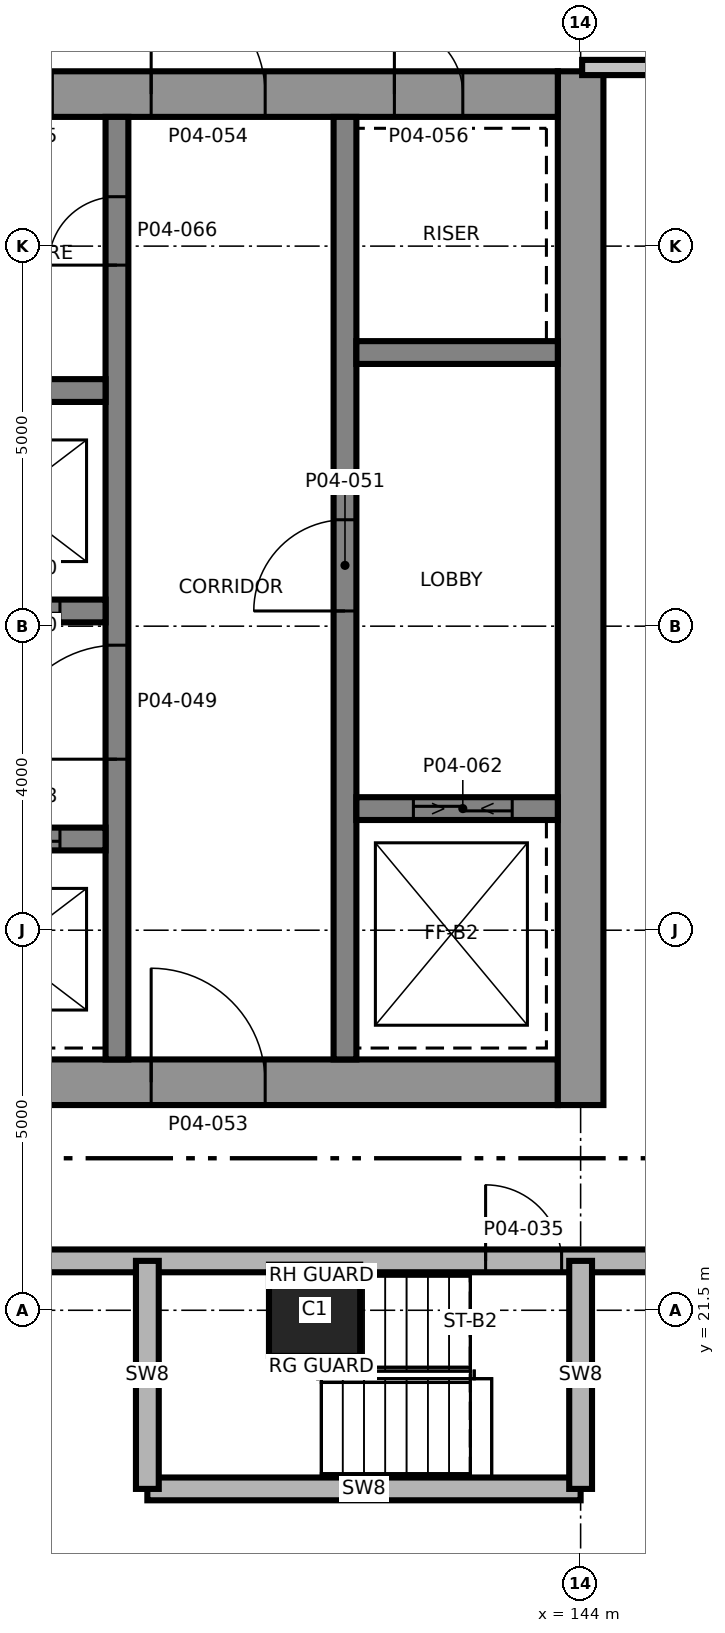
"""IFC4 building model, lengths in metres.
Left out: names, types, materials, properties, quantities, classifications, styles, units other than length and angle.
Written with IfcOpenShell. Run it as: python <this file> out.ifc"""

import sys

from ifc_helpers import new_model, si_unit, direction, frame, frame_2d, origin, origin_2d, place, context, subcontext, project, spatial, rectangle, extrude, element, fill, save


model = new_model("IFC4")
c1 = context("Model", 3, precision=1e-05, world=origin(), true_north=direction((0.0, 1.0)))
c2 = subcontext(c1, "Body", "Model", "MODEL_VIEW")
j1 = project(units=[si_unit("LENGTHUNIT", "METRE"), si_unit("PLANEANGLEUNIT", "RADIAN")], contexts=[c1])
p1 = place(None, origin())
s1 = spatial("IfcSite", under=j1, at=p1, CompositionType="ELEMENT")
p2 = place(p1, origin())
s2 = spatial("IfcBuilding", under=s1, at=p2, CompositionType="ELEMENT")
p3 = place(p2, frame((0.0, 0.0, 23.5)))
s3 = spatial("IfcBuildingStorey", under=s2, at=p3, CompositionType="ELEMENT", Elevation=23.5)
p4 = place(p3, frame((128.7, 24.5, 0.0), z_axis=(0.0, 0.0, 1.0), x_axis=(1.0, 0.0, 0.0)))
e1 = element("IfcWall", 1, at=p4, inside=s3, PredefinedType="SHEAR", context=c2, shape_type="SweptSolid", body=[
    extrude(rectangle(XDim=15.0, YDim=0.6, at=frame_2d((7.5, 0.0))), origin(), (0.0, 0.0, 1.0), 5.0),
])
p5 = place(p4, frame((9.65, 0.0, 0.0)))
e2 = element("IfcOpeningElement", 2, at=p5, cuts=e1, PredefinedType="OPENING", context=c2, shape_type="SweptSolid", body=[
    extrude(rectangle(XDim=1.5, YDim=2.1, at=frame_2d((0.75, 1.05))), frame((0.0, 0.31, 0.0), z_axis=(0.0, -1.0, 0.0), x_axis=(1.0, 0.0, 0.0)), (0.0, 0.0, 1.0), 0.62),
])
p6 = place(p4, frame((1.25, 0.0, 0.0)))
e3 = element("IfcOpeningElement", 3, at=p6, cuts=e1, PredefinedType="OPENING", context=c2, shape_type="SweptSolid", body=[
    extrude(rectangle(XDim=0.9, YDim=2.1, at=frame_2d((0.45, 1.05))), frame((0.0, 0.31, 0.0), z_axis=(0.0, -1.0, 0.0), x_axis=(1.0, 0.0, 0.0)), (0.0, 0.0, 1.0), 0.62),
])
p7 = place(p3, frame((144.0, 24.2, 0.0), z_axis=(0.0, 0.0, 1.0), x_axis=(0.0, 1.0, 0.0)))
e4 = element("IfcWall", 4, at=p7, inside=s3, PredefinedType="SHEAR", context=c2, shape_type="SweptSolid", body=[
    extrude(rectangle(XDim=13.6, YDim=0.6, at=frame_2d((6.8, 0.0))), origin(), (0.0, 0.0, 1.0), 5.0),
])
p8 = place(p3, frame((128.7, 37.5, 0.0), z_axis=(0.0, 0.0, 1.0), x_axis=(1.0, 0.0, 0.0)))
e5 = element("IfcWall", 5, at=p8, inside=s3, PredefinedType="SHEAR", context=c2, shape_type="SweptSolid", body=[
    extrude(rectangle(XDim=15.0, YDim=0.6, at=frame_2d((7.5, 0.0))), origin(), (0.0, 0.0, 1.0), 5.0),
])
p9 = place(p8, frame((9.65, 0.0, 0.0)))
e6 = element("IfcOpeningElement", 6, at=p9, cuts=e5, PredefinedType="OPENING", context=c2, shape_type="SweptSolid", body=[
    extrude(rectangle(XDim=1.5, YDim=2.1, at=frame_2d((0.75, 1.05))), frame((0.0, 0.31, 0.0), z_axis=(0.0, -1.0, 0.0), x_axis=(1.0, 0.0, 0.0)), (0.0, 0.0, 1.0), 0.62),
])
p10 = place(p8, frame((12.85, 0.0, 0.0)))
e7 = element("IfcOpeningElement", 7, at=p10, cuts=e5, PredefinedType="OPENING", context=c2, shape_type="SweptSolid", body=[
    extrude(rectangle(XDim=0.9, YDim=2.1, at=frame_2d((0.45, 1.05))), frame((0.0, 0.31, 0.0), z_axis=(0.0, -1.0, 0.0), x_axis=(1.0, 0.0, 0.0)), (0.0, 0.0, 1.0), 0.62),
])
p11 = place(p8, frame((3.65, 0.0, 0.0)))
e8 = element("IfcOpeningElement", 8, at=p11, cuts=e5, PredefinedType="OPENING", context=c2, shape_type="SweptSolid", body=[
    extrude(rectangle(XDim=0.9, YDim=2.1, at=frame_2d((0.45, 1.05))), frame((0.0, 0.31, 0.0), z_axis=(0.0, -1.0, 0.0), x_axis=(1.0, 0.0, 0.0)), (0.0, 0.0, 1.0), 0.62),
])
p12 = place(p8, frame((5.55, 0.0, 0.0)))
e9 = element("IfcOpeningElement", 9, at=p12, cuts=e5, PredefinedType="OPENING", context=c2, shape_type="SweptSolid", body=[
    extrude(rectangle(XDim=0.9, YDim=2.1, at=frame_2d((0.45, 1.05))), frame((0.0, 0.31, 0.0), z_axis=(0.0, -1.0, 0.0), x_axis=(1.0, 0.0, 0.0)), (0.0, 0.0, 1.0), 0.62),
])
p13 = place(p8, frame((7.45, 0.0, 0.0)))
e10 = element("IfcOpeningElement", 10, at=p13, cuts=e5, PredefinedType="OPENING", context=c2, shape_type="SweptSolid", body=[
    extrude(rectangle(XDim=0.9, YDim=2.1, at=frame_2d((0.45, 1.05))), frame((0.0, 0.31, 0.0), z_axis=(0.0, -1.0, 0.0), x_axis=(1.0, 0.0, 0.0)), (0.0, 0.0, 1.0), 0.62),
])
p14 = place(p3, frame((137.9, 24.8, 0.0), z_axis=(0.0, 0.0, 1.0), x_axis=(0.0, 1.0, 0.0)))
e11 = element("IfcWall", 11, at=p14, inside=s3, PredefinedType="SHEAR", context=c2, shape_type="SweptSolid", body=[
    extrude(rectangle(XDim=12.4, YDim=0.3, at=frame_2d((6.2, 0.0))), origin(), (0.0, 0.0, 1.0), 5.0),
])
p15 = place(p14, frame((3.95, 0.0, 0.0)))
e12 = element("IfcOpeningElement", 12, at=p15, cuts=e11, PredefinedType="OPENING", context=c2, shape_type="SweptSolid", body=[
    extrude(rectangle(XDim=1.5, YDim=2.1, at=frame_2d((0.75, 1.05))), frame((0.0, 0.16, 0.0), z_axis=(0.0, -1.0, 0.0), x_axis=(1.0, 0.0, 0.0)), (0.0, 0.0, 1.0), 0.32),
])
p16 = place(p14, frame((10.45, 0.0, 0.0)))
e13 = element("IfcOpeningElement", 13, at=p16, cuts=e11, PredefinedType="OPENING", context=c2, shape_type="SweptSolid", body=[
    extrude(rectangle(XDim=0.9, YDim=2.1, at=frame_2d((0.45, 1.05))), frame((0.0, 0.16, 0.0), z_axis=(0.0, -1.0, 0.0), x_axis=(1.0, 0.0, 0.0)), (0.0, 0.0, 1.0), 0.32),
])
p17 = place(p3, frame((140.9, 24.8, 0.0), z_axis=(0.0, 0.0, 1.0), x_axis=(0.0, 1.0, 0.0)))
e14 = element("IfcWall", 14, at=p17, inside=s3, PredefinedType="SHEAR", context=c2, shape_type="SweptSolid", body=[
    extrude(rectangle(XDim=12.4, YDim=0.3, at=frame_2d((6.2, 0.0))), origin(), (0.0, 0.0, 1.0), 5.0),
])
p18 = place(p17, frame((5.9, 0.0, 0.0)))
e15 = element("IfcOpeningElement", 15, at=p18, cuts=e14, PredefinedType="OPENING", context=c2, shape_type="SweptSolid", body=[
    extrude(rectangle(XDim=1.2, YDim=2.1, at=frame_2d((0.6, 1.05))), frame((0.0, 0.16, 0.0), z_axis=(0.0, -1.0, 0.0), x_axis=(1.0, 0.0, 0.0)), (0.0, 0.0, 1.0), 0.32),
])
p19 = place(p3, frame((132.25, 27.7, 0.0), z_axis=(0.0, 0.0, 1.0), x_axis=(1.0, 0.0, 0.0)))
e16 = element("IfcWall", 16, at=p19, inside=s3, PredefinedType="SHEAR", context=c2, shape_type="SweptSolid", body=[
    extrude(rectangle(XDim=5.5, YDim=0.3, at=frame_2d((2.75, 0.0))), origin(), (0.0, 0.0, 1.0), 5.0),
])
p20 = place(p19, frame((0.9, 0.0, 0.0)))
e17 = element("IfcOpeningElement", 17, at=p20, cuts=e16, PredefinedType="OPENING", context=c2, shape_type="SweptSolid", body=[
    extrude(rectangle(XDim=1.1, YDim=2.4, at=frame_2d((0.55, 1.2))), frame((0.0, 0.16, 0.0), z_axis=(0.0, -1.0, 0.0), x_axis=(1.0, 0.0, 0.0)), (0.0, 0.0, 1.0), 0.32),
])
p21 = place(p19, frame((3.8, 0.0, 0.0)))
e18 = element("IfcOpeningElement", 18, at=p21, cuts=e16, PredefinedType="OPENING", context=c2, shape_type="SweptSolid", body=[
    extrude(rectangle(XDim=1.1, YDim=2.4, at=frame_2d((0.55, 1.2))), frame((0.0, 0.16, 0.0), z_axis=(0.0, -1.0, 0.0), x_axis=(1.0, 0.0, 0.0)), (0.0, 0.0, 1.0), 0.32),
])
p22 = place(p3, frame((132.25, 30.7, 0.0), z_axis=(0.0, 0.0, 1.0), x_axis=(1.0, 0.0, 0.0)))
e19 = element("IfcWall", 19, at=p22, inside=s3, PredefinedType="SHEAR", context=c2, shape_type="SweptSolid", body=[
    extrude(rectangle(XDim=5.5, YDim=0.3, at=frame_2d((2.75, 0.0))), origin(), (0.0, 0.0, 1.0), 5.0),
])
p23 = place(p22, frame((0.9, 0.0, 0.0)))
e20 = element("IfcOpeningElement", 20, at=p23, cuts=e19, PredefinedType="OPENING", context=c2, shape_type="SweptSolid", body=[
    extrude(rectangle(XDim=1.1, YDim=2.4, at=frame_2d((0.55, 1.2))), frame((0.0, 0.16, 0.0), z_axis=(0.0, -1.0, 0.0), x_axis=(1.0, 0.0, 0.0)), (0.0, 0.0, 1.0), 0.32),
])
p24 = place(p22, frame((3.8, 0.0, 0.0)))
e21 = element("IfcOpeningElement", 21, at=p24, cuts=e19, PredefinedType="OPENING", context=c2, shape_type="SweptSolid", body=[
    extrude(rectangle(XDim=1.1, YDim=2.4, at=frame_2d((0.55, 1.2))), frame((0.0, 0.16, 0.0), z_axis=(0.0, -1.0, 0.0), x_axis=(1.0, 0.0, 0.0)), (0.0, 0.0, 1.0), 0.32),
])
p25 = place(p3, frame((132.25, 33.6, 0.0), z_axis=(0.0, 0.0, 1.0), x_axis=(1.0, 0.0, 0.0)))
e22 = element("IfcWall", 22, at=p25, inside=s3, PredefinedType="SHEAR", context=c2, shape_type="SweptSolid", body=[
    extrude(rectangle(XDim=5.5, YDim=0.3, at=frame_2d((2.75, 0.0))), origin(), (0.0, 0.0, 1.0), 5.0),
])
p26 = place(p3, frame((141.05, 28.1, 0.0), z_axis=(0.0, 0.0, 1.0), x_axis=(1.0, 0.0, 0.0)))
e23 = element("IfcWall", 23, at=p26, inside=s3, PredefinedType="SHEAR", context=c2, shape_type="SweptSolid", body=[
    extrude(rectangle(XDim=2.65, YDim=0.3, at=frame_2d((1.325, 0.0))), origin(), (0.0, 0.0, 1.0), 5.0),
])
p27 = place(p26, frame((0.75, 0.0, 0.0)))
e24 = element("IfcOpeningElement", 24, at=p27, cuts=e23, PredefinedType="OPENING", context=c2, shape_type="SweptSolid", body=[
    extrude(rectangle(XDim=1.3, YDim=2.4, at=frame_2d((0.65, 1.2))), frame((0.0, 0.16, 0.0), z_axis=(0.0, -1.0, 0.0), x_axis=(1.0, 0.0, 0.0)), (0.0, 0.0, 1.0), 0.32),
])
p28 = place(p3, frame((141.05, 34.1, 0.0), z_axis=(0.0, 0.0, 1.0), x_axis=(1.0, 0.0, 0.0)))
e25 = element("IfcWall", 25, at=p28, inside=s3, PredefinedType="SHEAR", context=c2, shape_type="SweptSolid", body=[
    extrude(rectangle(XDim=2.65, YDim=0.3, at=frame_2d((1.325, 0.0))), origin(), (0.0, 0.0, 1.0), 5.0),
])
p29 = place(p3, frame((140.5, 21.5, 0.0), z_axis=(0.0, 0.0, 1.0), x_axis=(1.0, 0.0, 0.0)))
e26 = element("IfcColumn", 26, at=p29, inside=s3, PredefinedType="COLUMN", context=c2, shape_type="SweptSolid", body=[
    extrude(rectangle(XDim=1.2, YDim=1.2, at=origin_2d()), origin(), (0.0, 0.0, 1.0), 5.0),
])
p30 = place(p3, frame((138.3, 19.15, 0.0), z_axis=(0.0, 0.0, 1.0), x_axis=(1.0, 0.0, 0.0)))
e27 = element("IfcWall", 27, at=p30, inside=s3, PredefinedType="SHEAR", context=c2, shape_type="SweptSolid", body=[
    extrude(rectangle(XDim=5.7, YDim=0.3, at=frame_2d((2.85, 0.0))), origin(), (0.0, 0.0, 1.0), 4.7),
])
p31 = place(p3, frame((125.75, 22.15, 0.0), z_axis=(0.0, 0.0, 1.0), x_axis=(1.0, 0.0, 0.0)))
e28 = element("IfcWall", 28, at=p31, inside=s3, PredefinedType="SHEAR", context=c2, shape_type="SweptSolid", body=[
    extrude(rectangle(XDim=21.5, YDim=0.3, at=frame_2d((10.75, 0.0))), origin(), (0.0, 0.0, 1.0), 4.7),
])
p32 = place(p31, frame((17.0, 0.0, 0.0)))
e29 = element("IfcOpeningElement", 29, at=p32, cuts=e28, PredefinedType="OPENING", context=c2, shape_type="SweptSolid", body=[
    extrude(rectangle(XDim=1.0, YDim=2.1, at=frame_2d((0.5, 1.05))), frame((0.0, 0.16, 0.0), z_axis=(0.0, -1.0, 0.0), x_axis=(1.0, 0.0, 0.0)), (0.0, 0.0, 1.0), 0.32),
])
p33 = place(p31, frame((6.75, 0.0, 0.0)))
e30 = element("IfcOpeningElement", 30, at=p33, cuts=e28, PredefinedType="OPENING", context=c2, shape_type="SweptSolid", body=[
    extrude(rectangle(XDim=1.0, YDim=2.1, at=frame_2d((0.5, 1.05))), frame((0.0, 0.16, 0.0), z_axis=(0.0, -1.0, 0.0), x_axis=(1.0, 0.0, 0.0)), (0.0, 0.0, 1.0), 0.32),
])
p34 = place(p3, frame((144.02, 37.85, 0.0), z_axis=(0.0, 0.0, 1.0), x_axis=(1.0, 0.0, 0.0)))
e31 = element("IfcWall", 31, at=p34, inside=s3, PredefinedType="PARTITIONING", context=c2, shape_type="SweptSolid", body=[
    extrude(rectangle(XDim=3.23, YDim=0.2, at=frame_2d((1.615, 0.0))), origin(), (0.0, 0.0, 1.0), 4.7),
])
p35 = place(p34, frame((1.03, 0.0, 0.0)))
e32 = element("IfcOpeningElement", 32, at=p35, cuts=e31, PredefinedType="OPENING", context=c2, shape_type="SweptSolid", body=[
    extrude(rectangle(XDim=1.5, YDim=2.1, at=frame_2d((0.75, 1.05))), frame((0.0, 0.11, 0.0), z_axis=(0.0, -1.0, 0.0), x_axis=(1.0, 0.0, 0.0)), (0.0, 0.0, 1.0), 0.22),
])
for number, where, z_axis, x_axis in (
    (33, (138.3, 19.15, 0.0), (0.0, 0.0, 1.0), (0.0, 1.0, 0.0)),
    (34, (144.0, 19.15, 0.0), (0.0, 0.0, 1.0), (0.0, 1.0, 0.0)),
):
    element("IfcWall", number, at=place(p3, frame(where, z_axis=z_axis, x_axis=x_axis)), inside=s3, PredefinedType="SHEAR", context=c2, shape_type="SweptSolid", body=[
        extrude(rectangle(XDim=3.0, YDim=0.3, at=frame_2d((1.5, 0.0))), origin(), (0.0, 0.0, 1.0), 4.7),
    ])
p36 = place(p32, origin())
e35 = element("IfcDoor", 35, at=p36, inside=s3, OperationType="SINGLE_SWING_LEFT", PredefinedType="DOOR", context=c2, shape_type="SweptSolid", body=[
    extrude(rectangle(XDim=1.0, YDim=2.1, at=frame_2d((0.5, 1.05))), frame((0.0, 0.025, 0.0), z_axis=(0.0, -1.0, 0.0), x_axis=(1.0, 0.0, 0.0)), (0.0, 0.0, 1.0), 0.05),
])
fill(e29, e35)
p37 = place(p15, origin())
e36 = element("IfcDoor", 36, at=p37, inside=s3, OperationType="SINGLE_SWING_RIGHT", PredefinedType="DOOR", context=c2, shape_type="SweptSolid", body=[
    extrude(rectangle(XDim=1.5, YDim=2.1, at=frame_2d((0.75, 1.05))), frame((0.0, 0.025, 0.0), z_axis=(0.0, -1.0, 0.0), x_axis=(1.0, 0.0, 0.0)), (0.0, 0.0, 1.0), 0.05),
])
fill(e12, e36)
p38 = place(p18, origin())
e37 = element("IfcDoor", 37, at=p38, inside=s3, OperationType="SINGLE_SWING_RIGHT", PredefinedType="DOOR", context=c2, shape_type="SweptSolid", body=[
    extrude(rectangle(XDim=1.2, YDim=2.1, at=frame_2d((0.6, 1.05))), frame((0.0, 0.025, 0.0), z_axis=(0.0, -1.0, 0.0), x_axis=(1.0, 0.0, 0.0)), (0.0, 0.0, 1.0), 0.05),
])
fill(e15, e37)
p39 = place(p5, origin())
e38 = element("IfcDoor", 38, at=p39, inside=s3, OperationType="SINGLE_SWING_LEFT", PredefinedType="DOOR", context=c2, shape_type="SweptSolid", body=[
    extrude(rectangle(XDim=1.5, YDim=2.1, at=frame_2d((0.75, 1.05))), frame((0.0, 0.025, 0.0), z_axis=(0.0, -1.0, 0.0), x_axis=(1.0, 0.0, 0.0)), (0.0, 0.0, 1.0), 0.05),
])
fill(e2, e38)
p40 = place(p9, origin())
e39 = element("IfcDoor", 39, at=p40, inside=s3, OperationType="SINGLE_SWING_RIGHT", PredefinedType="DOOR", context=c2, shape_type="SweptSolid", body=[
    extrude(rectangle(XDim=1.5, YDim=2.1, at=frame_2d((0.75, 1.05))), frame((0.0, 0.025, 0.0), z_axis=(0.0, -1.0, 0.0), x_axis=(1.0, 0.0, 0.0)), (0.0, 0.0, 1.0), 0.05),
])
fill(e6, e39)
p41 = place(p10, origin())
e40 = element("IfcDoor", 40, at=p41, inside=s3, OperationType="SINGLE_SWING_RIGHT", PredefinedType="DOOR", context=c2, shape_type="SweptSolid", body=[
    extrude(rectangle(XDim=0.9, YDim=2.1, at=frame_2d((0.45, 1.05))), frame((0.0, 0.025, 0.0), z_axis=(0.0, -1.0, 0.0), x_axis=(1.0, 0.0, 0.0)), (0.0, 0.0, 1.0), 0.05),
])
fill(e7, e40)
p42 = place(p21, origin())
e41 = element("IfcDoor", 41, at=p42, inside=s3, OperationType="SLIDING_TO_LEFT", PredefinedType="DOOR", context=c2, shape_type="SweptSolid", body=[
    extrude(rectangle(XDim=1.1, YDim=2.4, at=frame_2d((0.55, 1.2))), frame((0.0, 0.025, 0.0), z_axis=(0.0, -1.0, 0.0), x_axis=(1.0, 0.0, 0.0)), (0.0, 0.0, 1.0), 0.05),
])
fill(e18, e41)
p43 = place(p24, origin())
e42 = element("IfcDoor", 42, at=p43, inside=s3, OperationType="SLIDING_TO_LEFT", PredefinedType="DOOR", context=c2, shape_type="SweptSolid", body=[
    extrude(rectangle(XDim=1.1, YDim=2.4, at=frame_2d((0.55, 1.2))), frame((0.0, 0.025, 0.0), z_axis=(0.0, -1.0, 0.0), x_axis=(1.0, 0.0, 0.0)), (0.0, 0.0, 1.0), 0.05),
])
fill(e21, e42)
p44 = place(p27, origin())
e43 = element("IfcDoor", 43, at=p44, inside=s3, OperationType="SLIDING_TO_LEFT", PredefinedType="DOOR", context=c2, shape_type="SweptSolid", body=[
    extrude(rectangle(XDim=1.3, YDim=2.4, at=frame_2d((0.65, 1.2))), frame((0.0, 0.025, 0.0), z_axis=(0.0, -1.0, 0.0), x_axis=(1.0, 0.0, 0.0)), (0.0, 0.0, 1.0), 0.05),
])
fill(e24, e43)
p45 = place(p16, origin())
e44 = element("IfcDoor", 44, at=p45, inside=s3, OperationType="SINGLE_SWING_RIGHT", PredefinedType="DOOR", context=c2, shape_type="SweptSolid", body=[
    extrude(rectangle(XDim=0.9, YDim=2.1, at=frame_2d((0.45, 1.05))), frame((0.0, 0.025, 0.0), z_axis=(0.0, -1.0, 0.0), x_axis=(1.0, 0.0, 0.0)), (0.0, 0.0, 1.0), 0.05),
])
fill(e13, e44)
save(model, sys.argv[1])
